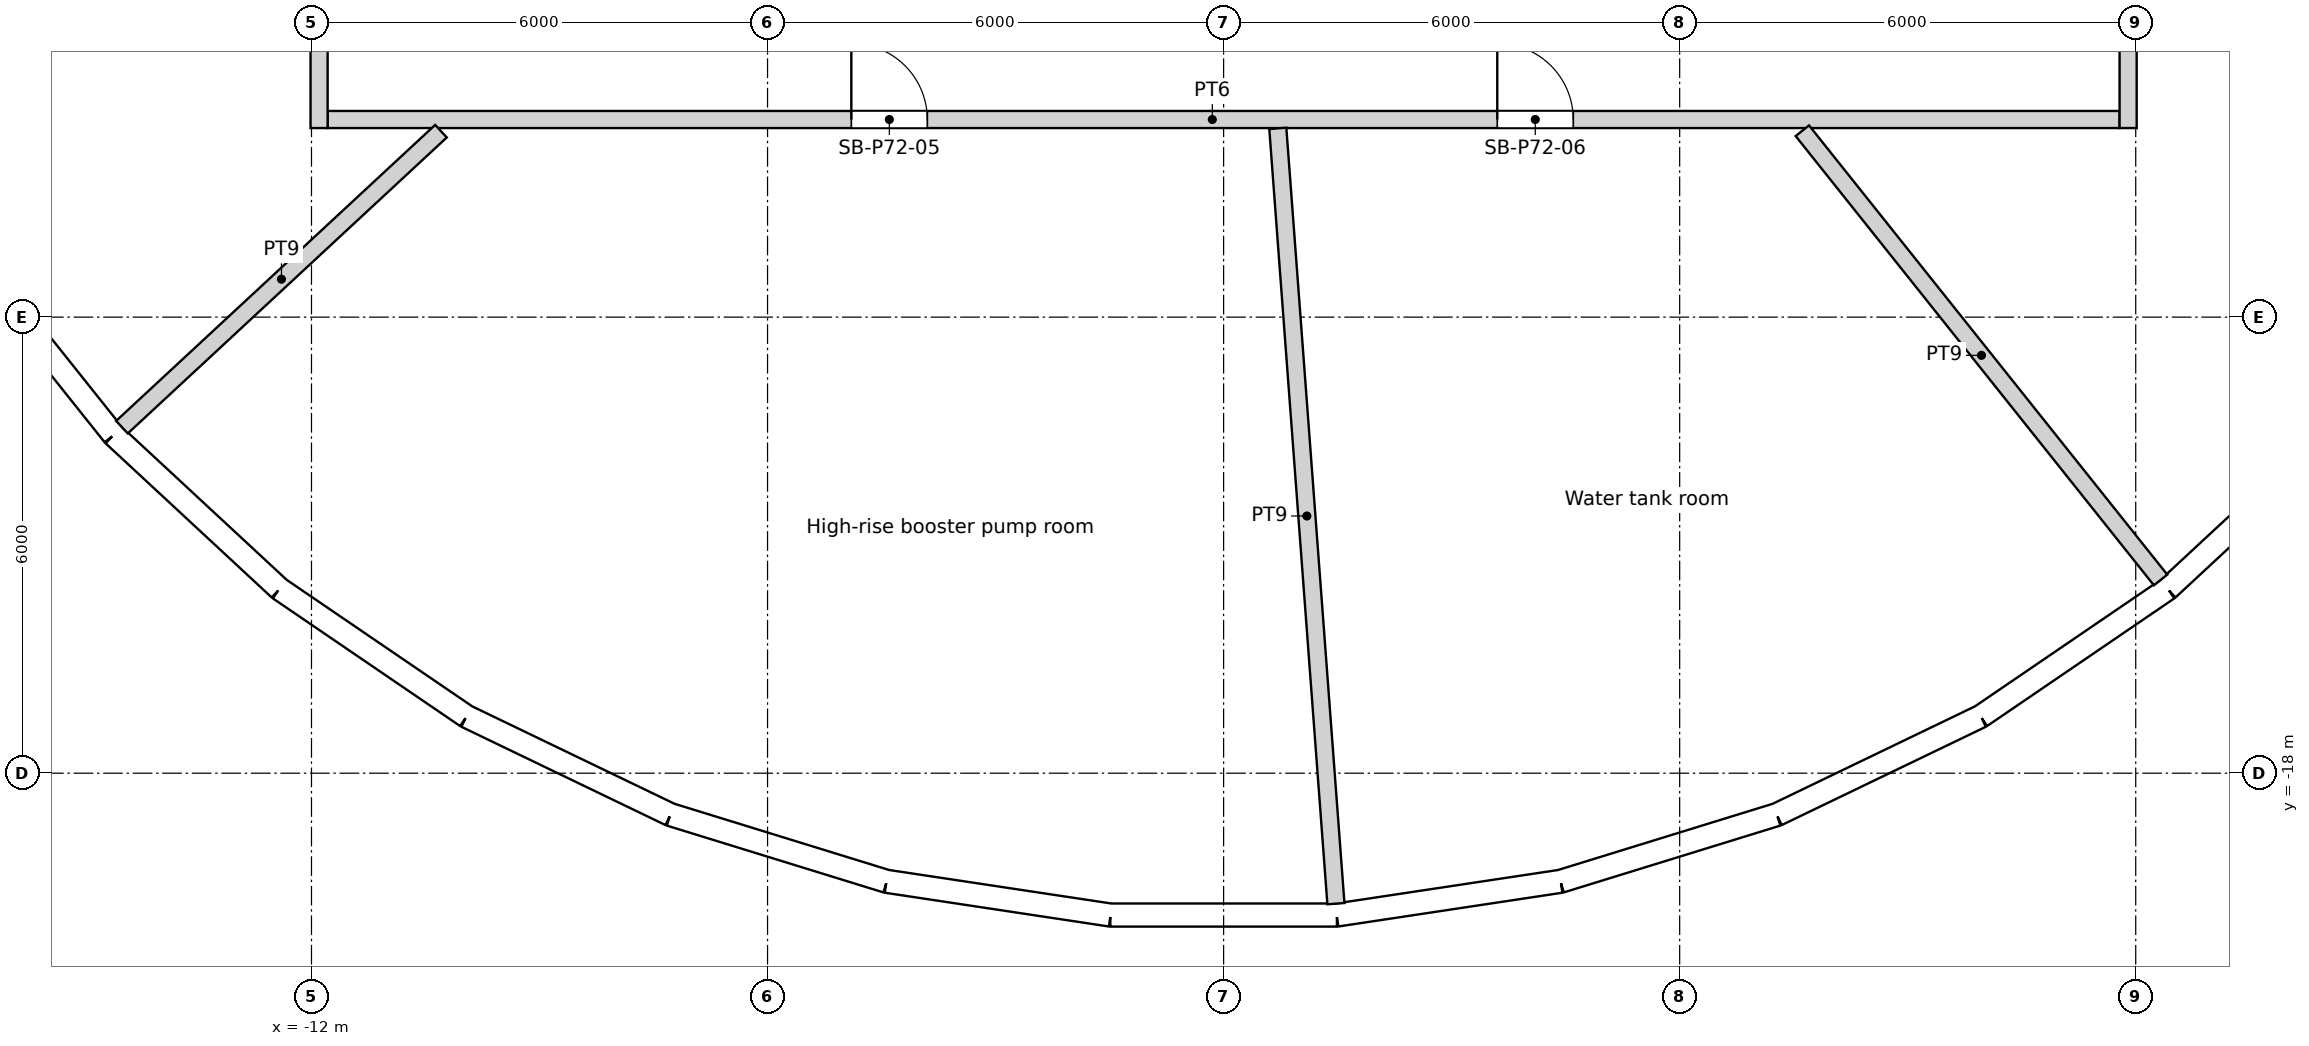
"""IFC4 building model, lengths in metres.
Left out: names, types, materials, properties, quantities, classifications, styles, units other than length and angle.
Written with IfcOpenShell. Run it as: python <this file> out.ifc"""

import sys

from ifc_helpers import new_model, si_unit, direction, frame, frame_2d, origin, origin_2d, place, context, subcontext, project, spatial, rectangle, circle, extrude, element, fill, save


model = new_model("IFC4")
c1 = context("Model", 3, precision=1e-05, world=origin(), true_north=direction((0.0, 1.0)))
c2 = subcontext(c1, "Body", "Model", "MODEL_VIEW")
j1 = project(units=[si_unit("LENGTHUNIT", "METRE"), si_unit("PLANEANGLEUNIT", "RADIAN")], contexts=[c1])
p1 = place(None, origin())
s1 = spatial("IfcSite", under=j1, at=p1, CompositionType="ELEMENT")
p2 = place(p1, origin())
s2 = spatial("IfcBuilding", under=s1, at=p2, CompositionType="ELEMENT")
p3 = place(p2, frame((0.0, 0.0, 277.8)))
s3 = spatial("IfcBuildingStorey", under=s2, at=p3, CompositionType="ELEMENT", Elevation=277.8)
for number, where, z_axis, x_axis in (
    (1, (-13.798, -12.802, 0.0), (0.0, 0.0, 1.0), (1.0, 0.0, 0.0)),
    (2, (-9.411, -16.301, 0.0), (0.0, 0.0, 1.0), (1.0, 0.0, 0.0)),
    (3, (-4.188, -18.35, 0.0), (0.0, 0.0, 1.0), (1.0, 0.0, 0.0)),
    (4, (1.406, -18.77, 0.0), (0.0, 0.0, 1.0), (1.0, 0.0, 0.0)),
    (5, (6.876, -17.521, 0.0), (0.0, 0.0, 1.0), (1.0, 0.0, 0.0)),
    (6, (11.735, -14.716, 0.0), (0.0, 0.0, 1.0), (1.0, 0.0, 0.0)),
):
    element("IfcColumn", number, at=place(p3, frame(where, z_axis=z_axis, x_axis=x_axis)), inside=s3, PredefinedType="COLUMN", context=c2, shape_type="SweptSolid", body=[
        extrude(circle(Radius=0.55, at=origin_2d()), origin(), (0.0, 0.0, 1.0), 6.0),
    ])
p4 = place(p3, frame((-16.46, -11.222, 0.0), z_axis=(0.0, 0.0, 1.0), x_axis=(0.623494374707, -0.781827835722, 0.0)))
e7 = element("IfcWall", 7, at=p4, inside=s3, PredefinedType="SOLIDWALL", context=c2, shape_type="SweptSolid", body=[
    extrude(rectangle(XDim=2.978, YDim=0.3, at=frame_2d((1.489, 0.0))), origin(), (0.0, 0.0, 1.0), 5.2),
])
p5 = place(p4, frame((1.489, 0.0, 1.825)))
e8 = element("IfcOpeningElement", 8, at=p5, cuts=e7, PredefinedType="OPENING", context=c2, shape_type="SweptSolid", body=[
    extrude(circle(Radius=1.2, at=origin_2d()), frame((0.0, 0.16, 0.0), z_axis=(0.0, -1.0, 0.0), x_axis=(1.0, 0.0, 0.0)), (0.0, 0.0, 1.0), 0.32),
])
p6 = place(p3, frame((-14.604, -13.55, 0.0), z_axis=(0.0, 0.0, 1.0), x_axis=(0.733056277766, -0.68016798927, 0.0)))
e9 = element("IfcWall", 9, at=p6, inside=s3, PredefinedType="SOLIDWALL", context=c2, shape_type="SweptSolid", body=[
    extrude(rectangle(XDim=2.978, YDim=0.3, at=frame_2d((1.489, 0.0))), origin(), (0.0, 0.0, 1.0), 5.65),
])
p7 = place(p6, frame((1.489, 0.0, 1.825)))
e10 = element("IfcOpeningElement", 10, at=p7, cuts=e9, PredefinedType="OPENING", context=c2, shape_type="SweptSolid", body=[
    extrude(circle(Radius=1.2, at=origin_2d()), frame((0.0, 0.16, 0.0), z_axis=(0.0, -1.0, 0.0), x_axis=(1.0, 0.0, 0.0)), (0.0, 0.0, 1.0), 0.32),
])
p8 = place(p3, frame((-12.421, -15.575, 0.0), z_axis=(0.0, 0.0, 1.0), x_axis=(0.826253362584, -0.56329866041, 0.0)))
e11 = element("IfcWall", 11, at=p8, inside=s3, PredefinedType="SOLIDWALL", context=c2, shape_type="SweptSolid", body=[
    extrude(rectangle(XDim=2.978, YDim=0.3, at=frame_2d((1.489, 0.0))), origin(), (0.0, 0.0, 1.0), 5.65),
])
p9 = place(p8, frame((1.489, 0.0, 1.825)))
e12 = element("IfcOpeningElement", 12, at=p9, cuts=e11, PredefinedType="OPENING", context=c2, shape_type="SweptSolid", body=[
    extrude(circle(Radius=1.2, at=origin_2d()), frame((0.0, 0.16, 0.0), z_axis=(0.0, -1.0, 0.0), x_axis=(1.0, 0.0, 0.0)), (0.0, 0.0, 1.0), 0.32),
])
p10 = place(p3, frame((-9.961, -17.253, 0.0), z_axis=(0.0, 0.0, 1.0), x_axis=(0.900954184324, -0.433914228562, 0.0)))
e13 = element("IfcWall", 13, at=p10, inside=s3, PredefinedType="SOLIDWALL", context=c2, shape_type="SweptSolid", body=[
    extrude(rectangle(XDim=2.978, YDim=0.3, at=frame_2d((1.489, 0.0))), origin(), (0.0, 0.0, 1.0), 5.2),
])
p11 = place(p10, frame((1.489, 0.0, 1.825)))
e14 = element("IfcOpeningElement", 14, at=p11, cuts=e13, PredefinedType="OPENING", context=c2, shape_type="SweptSolid", body=[
    extrude(circle(Radius=1.2, at=origin_2d()), frame((0.0, 0.16, 0.0), z_axis=(0.0, -1.0, 0.0), x_axis=(1.0, 0.0, 0.0)), (0.0, 0.0, 1.0), 0.32),
])
p12 = place(p3, frame((-7.278, -18.545, 0.0), z_axis=(0.0, 0.0, 1.0), x_axis=(0.955567792294, -0.294771427261, 0.0)))
e15 = element("IfcWall", 15, at=p12, inside=s3, PredefinedType="SOLIDWALL", context=c2, shape_type="SweptSolid", body=[
    extrude(rectangle(XDim=2.978, YDim=0.3, at=frame_2d((1.489, 0.0))), origin(), (0.0, 0.0, 1.0), 5.65),
])
p13 = place(p12, frame((1.489, 0.0, 1.825)))
e16 = element("IfcOpeningElement", 16, at=p13, cuts=e15, PredefinedType="OPENING", context=c2, shape_type="SweptSolid", body=[
    extrude(circle(Radius=1.2, at=origin_2d()), frame((0.0, 0.16, 0.0), z_axis=(0.0, -1.0, 0.0), x_axis=(1.0, 0.0, 0.0)), (0.0, 0.0, 1.0), 0.32),
])
p14 = place(p3, frame((-4.433, -19.422, 0.0), z_axis=(0.0, 0.0, 1.0), x_axis=(0.988839917871, -0.148981934558, 0.0)))
e17 = element("IfcWall", 17, at=p14, inside=s3, PredefinedType="SOLIDWALL", context=c2, shape_type="SweptSolid", body=[
    extrude(rectangle(XDim=2.978, YDim=0.3, at=frame_2d((1.489, 0.0))), origin(), (0.0, 0.0, 1.0), 5.65),
])
p15 = place(p14, frame((1.489, 0.0, 1.825)))
e18 = element("IfcOpeningElement", 18, at=p15, cuts=e17, PredefinedType="OPENING", context=c2, shape_type="SweptSolid", body=[
    extrude(circle(Radius=1.2, at=origin_2d()), frame((0.0, 0.16, 0.0), z_axis=(0.0, -1.0, 0.0), x_axis=(1.0, 0.0, 0.0)), (0.0, 0.0, 1.0), 0.32),
])
p16 = place(p3, frame((-1.489, -19.866, 0.0), z_axis=(0.0, 0.0, 1.0), x_axis=(1.0, 0.0, 0.0)))
e19 = element("IfcWall", 19, at=p16, inside=s3, PredefinedType="SOLIDWALL", context=c2, shape_type="SweptSolid", body=[
    extrude(rectangle(XDim=2.978, YDim=0.3, at=frame_2d((1.489, 0.0))), origin(), (0.0, 0.0, 1.0), 5.2),
])
p17 = place(p16, frame((1.489, 0.0, 1.825)))
e20 = element("IfcOpeningElement", 20, at=p17, cuts=e19, PredefinedType="OPENING", context=c2, shape_type="SweptSolid", body=[
    extrude(circle(Radius=1.2, at=origin_2d()), frame((0.0, 0.16, 0.0), z_axis=(0.0, -1.0, 0.0), x_axis=(1.0, 0.0, 0.0)), (0.0, 0.0, 1.0), 0.32),
])
p18 = place(p3, frame((1.489, -19.866, 0.0), z_axis=(0.0, 0.0, 1.0), x_axis=(0.988839917871, 0.148981934558, 0.0)))
e21 = element("IfcWall", 21, at=p18, inside=s3, PredefinedType="SOLIDWALL", context=c2, shape_type="SweptSolid", body=[
    extrude(rectangle(XDim=2.978, YDim=0.3, at=frame_2d((1.489, 0.0))), origin(), (0.0, 0.0, 1.0), 5.65),
])
p19 = place(p18, frame((1.489, 0.0, 1.825)))
e22 = element("IfcOpeningElement", 22, at=p19, cuts=e21, PredefinedType="OPENING", context=c2, shape_type="SweptSolid", body=[
    extrude(circle(Radius=1.2, at=origin_2d()), frame((0.0, 0.16, 0.0), z_axis=(0.0, -1.0, 0.0), x_axis=(1.0, 0.0, 0.0)), (0.0, 0.0, 1.0), 0.32),
])
p20 = place(p3, frame((4.433, -19.422, 0.0), z_axis=(0.0, 0.0, 1.0), x_axis=(0.955567792294, 0.294771427261, 0.0)))
e23 = element("IfcWall", 23, at=p20, inside=s3, PredefinedType="SOLIDWALL", context=c2, shape_type="SweptSolid", body=[
    extrude(rectangle(XDim=2.978, YDim=0.3, at=frame_2d((1.489, 0.0))), origin(), (0.0, 0.0, 1.0), 5.65),
])
p21 = place(p20, frame((1.489, 0.0, 1.825)))
e24 = element("IfcOpeningElement", 24, at=p21, cuts=e23, PredefinedType="OPENING", context=c2, shape_type="SweptSolid", body=[
    extrude(circle(Radius=1.2, at=origin_2d()), frame((0.0, 0.16, 0.0), z_axis=(0.0, -1.0, 0.0), x_axis=(1.0, 0.0, 0.0)), (0.0, 0.0, 1.0), 0.32),
])
p22 = place(p3, frame((7.278, -18.545, 0.0), z_axis=(0.0, 0.0, 1.0), x_axis=(0.900954184324, 0.433914228562, 0.0)))
e25 = element("IfcWall", 25, at=p22, inside=s3, PredefinedType="SOLIDWALL", context=c2, shape_type="SweptSolid", body=[
    extrude(rectangle(XDim=2.978, YDim=0.3, at=frame_2d((1.489, 0.0))), origin(), (0.0, 0.0, 1.0), 5.2),
])
p23 = place(p22, frame((1.489, 0.0, 1.825)))
e26 = element("IfcOpeningElement", 26, at=p23, cuts=e25, PredefinedType="OPENING", context=c2, shape_type="SweptSolid", body=[
    extrude(circle(Radius=1.2, at=origin_2d()), frame((0.0, 0.16, 0.0), z_axis=(0.0, -1.0, 0.0), x_axis=(1.0, 0.0, 0.0)), (0.0, 0.0, 1.0), 0.32),
])
p24 = place(p3, frame((9.961, -17.253, 0.0), z_axis=(0.0, 0.0, 1.0), x_axis=(0.826253362584, 0.56329866041, 0.0)))
e27 = element("IfcWall", 27, at=p24, inside=s3, PredefinedType="SOLIDWALL", context=c2, shape_type="SweptSolid", body=[
    extrude(rectangle(XDim=2.978, YDim=0.3, at=frame_2d((1.489, 0.0))), origin(), (0.0, 0.0, 1.0), 5.65),
])
p25 = place(p24, frame((1.489, 0.0, 1.825)))
e28 = element("IfcOpeningElement", 28, at=p25, cuts=e27, PredefinedType="OPENING", context=c2, shape_type="SweptSolid", body=[
    extrude(circle(Radius=1.2, at=origin_2d()), frame((0.0, 0.16, 0.0), z_axis=(0.0, -1.0, 0.0), x_axis=(1.0, 0.0, 0.0)), (0.0, 0.0, 1.0), 0.32),
])
p26 = place(p3, frame((12.421, -15.575, 0.0), z_axis=(0.0, 0.0, 1.0), x_axis=(0.733056277766, 0.68016798927, 0.0)))
e29 = element("IfcWall", 29, at=p26, inside=s3, PredefinedType="SOLIDWALL", context=c2, shape_type="SweptSolid", body=[
    extrude(rectangle(XDim=2.978, YDim=0.3, at=frame_2d((1.489, 0.0))), origin(), (0.0, 0.0, 1.0), 5.65),
])
p27 = place(p26, frame((1.489, 0.0, 1.825)))
e30 = element("IfcOpeningElement", 30, at=p27, cuts=e29, PredefinedType="OPENING", context=c2, shape_type="SweptSolid", body=[
    extrude(circle(Radius=1.2, at=origin_2d()), frame((0.0, 0.16, 0.0), z_axis=(0.0, -1.0, 0.0), x_axis=(1.0, 0.0, 0.0)), (0.0, 0.0, 1.0), 0.32),
])
p28 = place(p3, frame((-14.493, -13.448, 0.0), z_axis=(0.0, 0.0, 1.0), x_axis=(0.733050106305, 0.680174640549, 0.0)))
e31 = element("IfcWall", 31, at=p28, inside=s3, PredefinedType="PARTITIONING", context=c2, shape_type="SweptSolid", body=[
    extrude(rectangle(XDim=5.725, YDim=0.225, at=frame_2d((2.863, 0.0))), origin(), (0.0, 0.0, 1.0), 2.7),
])
p29 = place(p3, frame((-11.788, -9.4, 0.0), z_axis=(0.0, 0.0, 1.0), x_axis=(1.0, 0.0, 0.0)))
e32 = element("IfcWall", 32, at=p29, inside=s3, PredefinedType="PARTITIONING", context=c2, shape_type="SweptSolid", body=[
    extrude(rectangle(XDim=23.575, YDim=0.225, at=frame_2d((11.788, 0.0))), origin(), (0.0, 0.0, 1.0), 5.65),
])
p30 = place(p29, frame((6.89, 0.0, 0.0)))
e33 = element("IfcOpeningElement", 33, at=p30, cuts=e32, PredefinedType="OPENING", context=c2, shape_type="SweptSolid", body=[
    extrude(rectangle(XDim=1.0, YDim=2.1, at=frame_2d((0.5, 1.05))), frame((0.0, 0.113, 0.0), z_axis=(0.0, -1.0, 0.0), x_axis=(1.0, 0.0, 0.0)), (0.0, 0.0, 1.0), 0.225),
])
p31 = place(p29, frame((15.388, 0.0, 0.0)))
e34 = element("IfcOpeningElement", 34, at=p31, cuts=e32, PredefinedType="OPENING", context=c2, shape_type="SweptSolid", body=[
    extrude(rectangle(XDim=1.0, YDim=2.1, at=frame_2d((0.5, 1.05))), frame((0.0, 0.113, 0.0), z_axis=(0.0, -1.0, 0.0), x_axis=(1.0, 0.0, 0.0)), (0.0, 0.0, 1.0), 0.225),
])
p32 = place(p3, frame((-11.9, 9.288, 0.0), z_axis=(0.0, 0.0, 1.0), x_axis=(0.0, -1.0, 0.0)))
e35 = element("IfcWall", 35, at=p32, inside=s3, PredefinedType="PARTITIONING", context=c2, shape_type="SweptSolid", body=[
    extrude(rectangle(XDim=18.8, YDim=0.225, at=frame_2d((9.4, 0.0))), origin(), (0.0, 0.0, 1.0), 5.65),
])
p33 = place(p32, frame((2.791, 0.0, 0.0)))
e36 = element("IfcOpeningElement", 36, at=p33, cuts=e35, PredefinedType="OPENING", context=c2, shape_type="SweptSolid", body=[
    extrude(rectangle(XDim=1.8, YDim=2.4, at=frame_2d((0.9, 1.2))), frame((0.0, 0.113, 0.0), z_axis=(0.0, -1.0, 0.0), x_axis=(1.0, 0.0, 0.0)), (0.0, 0.0, 1.0), 0.225),
])
p34 = place(p32, frame((12.591, 0.0, 0.0)))
e37 = element("IfcOpeningElement", 37, at=p34, cuts=e35, PredefinedType="OPENING", context=c2, shape_type="SweptSolid", body=[
    extrude(rectangle(XDim=1.0, YDim=2.1, at=frame_2d((0.5, 1.05))), frame((0.0, 0.113, 0.0), z_axis=(0.0, -1.0, 0.0), x_axis=(1.0, 0.0, 0.0)), (0.0, 0.0, 1.0), 0.225),
])
p35 = place(p3, frame((1.478, -19.716, 0.0), z_axis=(0.0, 0.0, 1.0), x_axis=(-0.074735948373, 0.997203358408, 0.0)))
e38 = element("IfcWall", 38, at=p35, inside=s3, PredefinedType="PARTITIONING", context=c2, shape_type="SweptSolid", body=[
    extrude(rectangle(XDim=10.228, YDim=0.225, at=frame_2d((5.114, 0.0))), origin(), (0.0, 0.0, 1.0), 2.7),
])
p36 = place(p3, frame((11.9, -9.512, 0.0), z_axis=(0.0, 0.0, 1.0), x_axis=(0.0, 1.0, 0.0)))
e39 = element("IfcWall", 39, at=p36, inside=s3, PredefinedType="PARTITIONING", context=c2, shape_type="SweptSolid", body=[
    extrude(rectangle(XDim=9.512, YDim=0.225, at=frame_2d((4.756, 0.0))), origin(), (0.0, 0.0, 1.0), 5.65),
])
p37 = place(p36, frame((4.312, 0.0, 0.0)))
e40 = element("IfcOpeningElement", 40, at=p37, cuts=e39, PredefinedType="OPENING", context=c2, shape_type="SweptSolid", body=[
    extrude(rectangle(XDim=1.0, YDim=2.1, at=frame_2d((0.5, 1.05))), frame((0.0, 0.113, 0.0), z_axis=(0.0, -1.0, 0.0), x_axis=(1.0, 0.0, 0.0)), (0.0, 0.0, 1.0), 0.225),
])
p38 = place(p3, frame((12.327, -15.458, 0.0), z_axis=(0.0, 0.0, 1.0), x_axis=(-0.623469403717, 0.781847749008, 0.0)))
e41 = element("IfcWall", 41, at=p38, inside=s3, PredefinedType="PARTITIONING", context=c2, shape_type="SweptSolid", body=[
    extrude(rectangle(XDim=7.56, YDim=0.225, at=frame_2d((3.78, 0.0))), origin(), (0.0, 0.0, 1.0), 2.7),
])
p39 = place(p5, origin())
e42 = element("IfcWindow", 42, at=p39, inside=s3, PartitioningType="SINGLE_PANEL", PredefinedType="WINDOW", context=c2, shape_type="SweptSolid", body=[
    extrude(circle(Radius=1.2, at=origin_2d()), frame((0.0, 0.12, 0.0), z_axis=(0.0, -1.0, 0.0), x_axis=(1.0, 0.0, 0.0)), (0.0, 0.0, 1.0), 0.1),
])
fill(e8, e42)
p40 = place(p7, origin())
e43 = element("IfcWindow", 43, at=p40, inside=s3, PartitioningType="SINGLE_PANEL", PredefinedType="WINDOW", context=c2, shape_type="SweptSolid", body=[
    extrude(circle(Radius=1.2, at=origin_2d()), frame((0.0, 0.12, 0.0), z_axis=(0.0, -1.0, 0.0), x_axis=(1.0, 0.0, 0.0)), (0.0, 0.0, 1.0), 0.1),
])
fill(e10, e43)
p41 = place(p9, origin())
e44 = element("IfcWindow", 44, at=p41, inside=s3, PartitioningType="SINGLE_PANEL", PredefinedType="WINDOW", context=c2, shape_type="SweptSolid", body=[
    extrude(circle(Radius=1.2, at=origin_2d()), frame((0.0, 0.12, 0.0), z_axis=(0.0, -1.0, 0.0), x_axis=(1.0, 0.0, 0.0)), (0.0, 0.0, 1.0), 0.1),
])
fill(e12, e44)
p42 = place(p11, origin())
e45 = element("IfcWindow", 45, at=p42, inside=s3, PartitioningType="SINGLE_PANEL", PredefinedType="WINDOW", context=c2, shape_type="SweptSolid", body=[
    extrude(circle(Radius=1.2, at=origin_2d()), frame((0.0, 0.12, 0.0), z_axis=(0.0, -1.0, 0.0), x_axis=(1.0, 0.0, 0.0)), (0.0, 0.0, 1.0), 0.1),
])
fill(e14, e45)
p43 = place(p13, origin())
e46 = element("IfcWindow", 46, at=p43, inside=s3, PartitioningType="SINGLE_PANEL", PredefinedType="WINDOW", context=c2, shape_type="SweptSolid", body=[
    extrude(circle(Radius=1.2, at=origin_2d()), frame((0.0, 0.12, 0.0), z_axis=(0.0, -1.0, 0.0), x_axis=(1.0, 0.0, 0.0)), (0.0, 0.0, 1.0), 0.1),
])
fill(e16, e46)
p44 = place(p15, origin())
e47 = element("IfcWindow", 47, at=p44, inside=s3, PartitioningType="SINGLE_PANEL", PredefinedType="WINDOW", context=c2, shape_type="SweptSolid", body=[
    extrude(circle(Radius=1.2, at=origin_2d()), frame((0.0, 0.12, 0.0), z_axis=(0.0, -1.0, 0.0), x_axis=(1.0, 0.0, 0.0)), (0.0, 0.0, 1.0), 0.1),
])
fill(e18, e47)
p45 = place(p17, origin())
e48 = element("IfcWindow", 48, at=p45, inside=s3, PartitioningType="SINGLE_PANEL", PredefinedType="WINDOW", context=c2, shape_type="SweptSolid", body=[
    extrude(circle(Radius=1.2, at=origin_2d()), frame((0.0, 0.12, 0.0), z_axis=(0.0, -1.0, 0.0), x_axis=(1.0, 0.0, 0.0)), (0.0, 0.0, 1.0), 0.1),
])
fill(e20, e48)
p46 = place(p19, origin())
e49 = element("IfcWindow", 49, at=p46, inside=s3, PartitioningType="SINGLE_PANEL", PredefinedType="WINDOW", context=c2, shape_type="SweptSolid", body=[
    extrude(circle(Radius=1.2, at=origin_2d()), frame((0.0, 0.12, 0.0), z_axis=(0.0, -1.0, 0.0), x_axis=(1.0, 0.0, 0.0)), (0.0, 0.0, 1.0), 0.1),
])
fill(e22, e49)
p47 = place(p21, origin())
e50 = element("IfcWindow", 50, at=p47, inside=s3, PartitioningType="SINGLE_PANEL", PredefinedType="WINDOW", context=c2, shape_type="SweptSolid", body=[
    extrude(circle(Radius=1.2, at=origin_2d()), frame((0.0, 0.12, 0.0), z_axis=(0.0, -1.0, 0.0), x_axis=(1.0, 0.0, 0.0)), (0.0, 0.0, 1.0), 0.1),
])
fill(e24, e50)
p48 = place(p23, origin())
e51 = element("IfcWindow", 51, at=p48, inside=s3, PartitioningType="SINGLE_PANEL", PredefinedType="WINDOW", context=c2, shape_type="SweptSolid", body=[
    extrude(circle(Radius=1.2, at=origin_2d()), frame((0.0, 0.12, 0.0), z_axis=(0.0, -1.0, 0.0), x_axis=(1.0, 0.0, 0.0)), (0.0, 0.0, 1.0), 0.1),
])
fill(e26, e51)
p49 = place(p25, origin())
e52 = element("IfcWindow", 52, at=p49, inside=s3, PartitioningType="SINGLE_PANEL", PredefinedType="WINDOW", context=c2, shape_type="SweptSolid", body=[
    extrude(circle(Radius=1.2, at=origin_2d()), frame((0.0, 0.12, 0.0), z_axis=(0.0, -1.0, 0.0), x_axis=(1.0, 0.0, 0.0)), (0.0, 0.0, 1.0), 0.1),
])
fill(e28, e52)
p50 = place(p27, origin())
e53 = element("IfcWindow", 53, at=p50, inside=s3, PartitioningType="SINGLE_PANEL", PredefinedType="WINDOW", context=c2, shape_type="SweptSolid", body=[
    extrude(circle(Radius=1.2, at=origin_2d()), frame((0.0, 0.12, 0.0), z_axis=(0.0, -1.0, 0.0), x_axis=(1.0, 0.0, 0.0)), (0.0, 0.0, 1.0), 0.1),
])
fill(e30, e53)
p51 = place(p30, origin())
e54 = element("IfcDoor", 54, at=p51, inside=s3, OperationType="SINGLE_SWING_LEFT", PredefinedType="DOOR", context=c2, shape_type="SweptSolid", body=[
    extrude(rectangle(XDim=1.0, YDim=2.1, at=frame_2d((0.5, 1.05))), frame((0.0, 0.025, 0.0), z_axis=(0.0, -1.0, 0.0), x_axis=(1.0, 0.0, 0.0)), (0.0, 0.0, 1.0), 0.05),
])
fill(e33, e54)
p52 = place(p31, origin())
e55 = element("IfcDoor", 55, at=p52, inside=s3, OperationType="SINGLE_SWING_LEFT", PredefinedType="DOOR", context=c2, shape_type="SweptSolid", body=[
    extrude(rectangle(XDim=1.0, YDim=2.1, at=frame_2d((0.5, 1.05))), frame((0.0, 0.025, 0.0), z_axis=(0.0, -1.0, 0.0), x_axis=(1.0, 0.0, 0.0)), (0.0, 0.0, 1.0), 0.05),
])
fill(e34, e55)
save(model, sys.argv[1])
